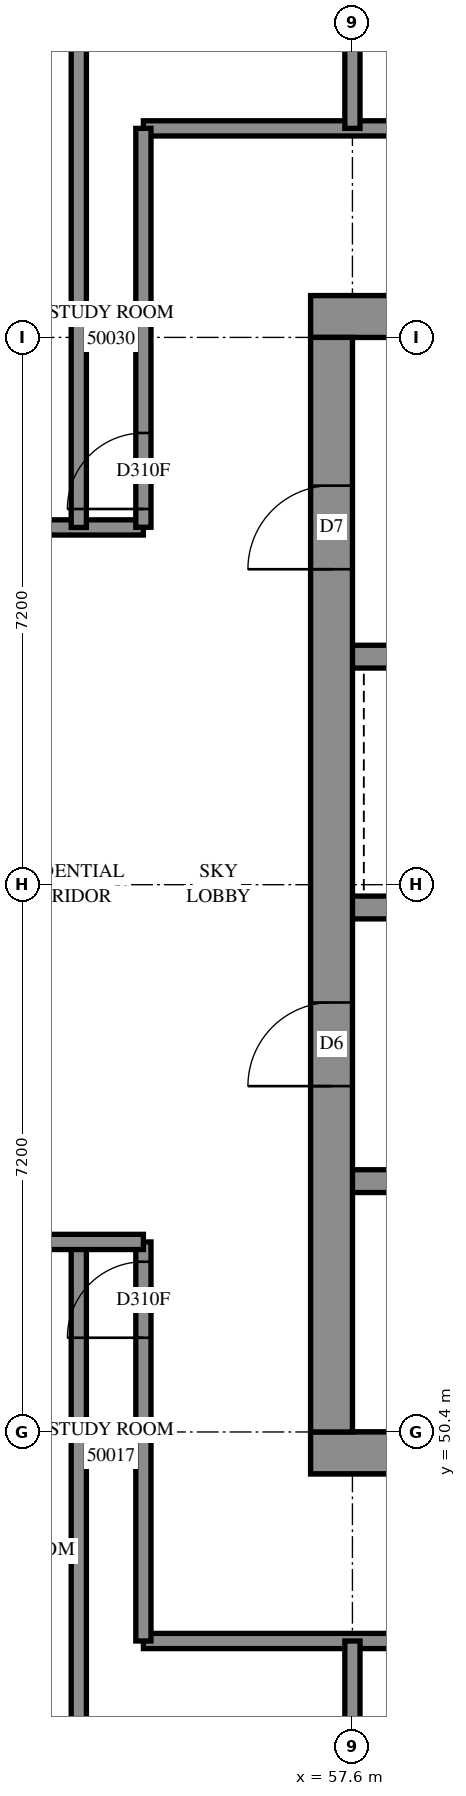
"""IFC4 building model, lengths in metres.
Left out: names, types, materials, properties, quantities, classifications, styles, units other than length and angle.
Written with IfcOpenShell. Run it as: python <this file> out.ifc"""

import sys

from ifc_helpers import new_model, si_unit, direction, frame, frame_2d, origin, place, context, subcontext, project, spatial, rectangle, extrude, element, fill, save


model = new_model("IFC4")
c1 = context("Model", 3, precision=1e-05, world=origin(), true_north=direction((0.0, 1.0)))
c2 = subcontext(c1, "Body", "Model", "MODEL_VIEW")
j1 = project(units=[si_unit("LENGTHUNIT", "METRE"), si_unit("PLANEANGLEUNIT", "RADIAN")], contexts=[c1])
p1 = place(None, origin())
s1 = spatial("IfcSite", under=j1, at=p1, CompositionType="ELEMENT")
p2 = place(p1, origin())
s2 = spatial("IfcBuilding", under=s1, at=p2, CompositionType="ELEMENT")
p3 = place(p2, frame((0.0, 0.0, 185.4)))
s3 = spatial("IfcBuildingStorey", under=s2, at=p3, CompositionType="ELEMENT", Elevation=185.4)
p4 = place(p3, frame((57.05, 50.125, -0.3), z_axis=(0.0, 0.0, 1.0), x_axis=(1.0, 0.0, 0.0)))
e1 = element("IfcWall", 1, at=p4, inside=s3, PredefinedType="SHEAR", context=c2, shape_type="SweptSolid", body=[
    extrude(rectangle(XDim=15.5, YDim=0.55, at=frame_2d((7.75, 0.0))), origin(), (0.0, 0.0, 1.0), 3.5),
])
p5 = place(p3, frame((57.05, 65.075, -0.3), z_axis=(0.0, 0.0, 1.0), x_axis=(1.0, 0.0, 0.0)))
e2 = element("IfcWall", 2, at=p5, inside=s3, PredefinedType="SHEAR", context=c2, shape_type="SweptSolid", body=[
    extrude(rectangle(XDim=15.5, YDim=0.55, at=frame_2d((7.75, 0.0))), origin(), (0.0, 0.0, 1.0), 3.5),
])
p6 = place(p5, frame((10.55, 0.0, 0.3)))
e3 = element("IfcOpeningElement", 3, at=p6, cuts=e2, PredefinedType="OPENING", context=c2, shape_type="SweptSolid", body=[
    extrude(rectangle(XDim=0.8, YDim=2.1, at=frame_2d((0.4, 1.05))), frame((0.0, 0.285, 0.0), z_axis=(0.0, -1.0, 0.0), x_axis=(1.0, 0.0, 0.0)), (0.0, 0.0, 1.0), 0.57),
])
p7 = place(p3, frame((57.325, 50.4, -0.3), z_axis=(0.0, 0.0, 1.0), x_axis=(0.0, 1.0, 0.0)))
e4 = element("IfcWall", 4, at=p7, inside=s3, PredefinedType="SHEAR", context=c2, shape_type="SweptSolid", body=[
    extrude(rectangle(XDim=14.4, YDim=0.55, at=frame_2d((7.2, 0.0))), origin(), (0.0, 0.0, 1.0), 3.5),
])
p8 = place(p7, frame((4.55, 0.0, 0.3)))
e5 = element("IfcOpeningElement", 5, at=p8, cuts=e4, PredefinedType="OPENING", context=c2, shape_type="SweptSolid", body=[
    extrude(rectangle(XDim=1.1, YDim=2.1, at=frame_2d((0.55, 1.05))), frame((0.0, 0.285, 0.0), z_axis=(0.0, -1.0, 0.0), x_axis=(1.0, 0.0, 0.0)), (0.0, 0.0, 1.0), 0.57),
])
p9 = place(p7, frame((11.35, 0.0, 0.3)))
e6 = element("IfcOpeningElement", 6, at=p9, cuts=e4, PredefinedType="OPENING", context=c2, shape_type="SweptSolid", body=[
    extrude(rectangle(XDim=1.1, YDim=2.1, at=frame_2d((0.55, 1.05))), frame((0.0, 0.285, 0.0), z_axis=(0.0, -1.0, 0.0), x_axis=(1.0, 0.0, 0.0)), (0.0, 0.0, 1.0), 0.57),
])
p10 = place(p3, frame((57.6, 53.7, 0.0), z_axis=(0.0, 0.0, 1.0), x_axis=(1.0, 0.0, 0.0)))
e7 = element("IfcWall", 7, at=p10, inside=s3, PredefinedType="SOLIDWALL", context=c2, shape_type="SweptSolid", body=[
    extrude(rectangle(XDim=14.4, YDim=0.3, at=frame_2d((7.2, 0.0))), origin(), (0.0, 0.0, 1.0), 3.9),
])
p11 = place(p10, frame((1.35, 0.0, 0.0)))
e8 = element("IfcOpeningElement", 8, at=p11, cuts=e7, PredefinedType="OPENING", context=c2, shape_type="SweptSolid", body=[
    extrude(rectangle(XDim=0.9, YDim=2.1, at=frame_2d((0.45, 1.05))), frame((0.0, 0.16, 0.0), z_axis=(0.0, -1.0, 0.0), x_axis=(1.0, 0.0, 0.0)), (0.0, 0.0, 1.0), 0.32),
])
p12 = place(p10, frame((4.95, 0.0, 0.0)))
e9 = element("IfcOpeningElement", 9, at=p12, cuts=e7, PredefinedType="OPENING", context=c2, shape_type="SweptSolid", body=[
    extrude(rectangle(XDim=0.9, YDim=2.1, at=frame_2d((0.45, 1.05))), frame((0.0, 0.16, 0.0), z_axis=(0.0, -1.0, 0.0), x_axis=(1.0, 0.0, 0.0)), (0.0, 0.0, 1.0), 0.32),
])
p13 = place(p10, frame((8.55, 0.0, 0.0)))
e10 = element("IfcOpeningElement", 10, at=p13, cuts=e7, PredefinedType="OPENING", context=c2, shape_type="SweptSolid", body=[
    extrude(rectangle(XDim=0.9, YDim=2.1, at=frame_2d((0.45, 1.05))), frame((0.0, 0.16, 0.0), z_axis=(0.0, -1.0, 0.0), x_axis=(1.0, 0.0, 0.0)), (0.0, 0.0, 1.0), 0.32),
])
p14 = place(p10, frame((12.05, 0.0, 0.0)))
e11 = element("IfcOpeningElement", 11, at=p14, cuts=e7, PredefinedType="OPENING", context=c2, shape_type="SweptSolid", body=[
    extrude(rectangle(XDim=1.1, YDim=2.1, at=frame_2d((0.55, 1.05))), frame((0.0, 0.16, 0.0), z_axis=(0.0, -1.0, 0.0), x_axis=(1.0, 0.0, 0.0)), (0.0, 0.0, 1.0), 0.32),
])
p15 = place(p3, frame((57.6, 57.3, 0.0), z_axis=(0.0, 0.0, 1.0), x_axis=(1.0, 0.0, 0.0)))
e12 = element("IfcWall", 12, at=p15, inside=s3, PredefinedType="SOLIDWALL", context=c2, shape_type="SweptSolid", body=[
    extrude(rectangle(XDim=14.4, YDim=0.3, at=frame_2d((7.2, 0.0))), origin(), (0.0, 0.0, 1.0), 3.9),
])
p16 = place(p15, frame((1.25, 0.0, 0.0)))
e13 = element("IfcOpeningElement", 13, at=p16, cuts=e12, PredefinedType="OPENING", context=c2, shape_type="SweptSolid", body=[
    extrude(rectangle(XDim=1.1, YDim=2.1, at=frame_2d((0.55, 1.05))), frame((0.0, 0.16, 0.0), z_axis=(0.0, -1.0, 0.0), x_axis=(1.0, 0.0, 0.0)), (0.0, 0.0, 1.0), 0.32),
])
p17 = place(p15, frame((4.85, 0.0, 0.0)))
e14 = element("IfcOpeningElement", 14, at=p17, cuts=e12, PredefinedType="OPENING", context=c2, shape_type="SweptSolid", body=[
    extrude(rectangle(XDim=1.1, YDim=2.1, at=frame_2d((0.55, 1.05))), frame((0.0, 0.16, 0.0), z_axis=(0.0, -1.0, 0.0), x_axis=(1.0, 0.0, 0.0)), (0.0, 0.0, 1.0), 0.32),
])
p18 = place(p15, frame((8.45, 0.0, 0.0)))
e15 = element("IfcOpeningElement", 15, at=p18, cuts=e12, PredefinedType="OPENING", context=c2, shape_type="SweptSolid", body=[
    extrude(rectangle(XDim=1.1, YDim=2.1, at=frame_2d((0.55, 1.05))), frame((0.0, 0.16, 0.0), z_axis=(0.0, -1.0, 0.0), x_axis=(1.0, 0.0, 0.0)), (0.0, 0.0, 1.0), 0.32),
])
p19 = place(p15, frame((12.05, 0.0, 0.0)))
e16 = element("IfcOpeningElement", 16, at=p19, cuts=e12, PredefinedType="OPENING", context=c2, shape_type="SweptSolid", body=[
    extrude(rectangle(XDim=1.1, YDim=2.1, at=frame_2d((0.55, 1.05))), frame((0.0, 0.16, 0.0), z_axis=(0.0, -1.0, 0.0), x_axis=(1.0, 0.0, 0.0)), (0.0, 0.0, 1.0), 0.32),
])
p20 = place(p3, frame((57.6, 60.6, 0.0), z_axis=(0.0, 0.0, 1.0), x_axis=(1.0, 0.0, 0.0)))
e17 = element("IfcWall", 17, at=p20, inside=s3, PredefinedType="SOLIDWALL", context=c2, shape_type="SweptSolid", body=[
    extrude(rectangle(XDim=7.2, YDim=0.3, at=frame_2d((3.6, 0.0))), origin(), (0.0, 0.0, 1.0), 3.9),
])
p21 = place(p3, frame((54.85, 67.55, 0.0), z_axis=(0.0, 0.0, 1.0), x_axis=(1.0, 0.0, 0.0)))
e18 = element("IfcWall", 18, at=p21, inside=s3, PredefinedType="PARTITIONING", context=c2, shape_type="SweptSolid", body=[
    extrude(rectangle(XDim=19.9, YDim=0.2, at=frame_2d((9.95, 0.0))), origin(), (0.0, 0.0, 1.0), 3.9),
])
p22 = place(p21, frame((4.843, 0.0, 0.0)))
e19 = element("IfcOpeningElement", 19, at=p22, cuts=e18, PredefinedType="OPENING", context=c2, shape_type="SweptSolid", body=[
    extrude(rectangle(XDim=1.0, YDim=2.1, at=frame_2d((0.5, 1.05))), frame((0.0, 0.11, 0.0), z_axis=(0.0, -1.0, 0.0), x_axis=(1.0, 0.0, 0.0)), (0.0, 0.0, 1.0), 0.22),
])
p23 = place(p21, frame((6.918, 0.0, 0.0)))
e20 = element("IfcOpeningElement", 20, at=p23, cuts=e18, PredefinedType="OPENING", context=c2, shape_type="SweptSolid", body=[
    extrude(rectangle(XDim=1.0, YDim=2.1, at=frame_2d((0.5, 1.05))), frame((0.0, 0.11, 0.0), z_axis=(0.0, -1.0, 0.0), x_axis=(1.0, 0.0, 0.0)), (0.0, 0.0, 1.0), 0.22),
])
p24 = place(p21, frame((12.043, 0.0, 0.0)))
e21 = element("IfcOpeningElement", 21, at=p24, cuts=e18, PredefinedType="OPENING", context=c2, shape_type="SweptSolid", body=[
    extrude(rectangle(XDim=1.0, YDim=2.1, at=frame_2d((0.5, 1.05))), frame((0.0, 0.11, 0.0), z_axis=(0.0, -1.0, 0.0), x_axis=(1.0, 0.0, 0.0)), (0.0, 0.0, 1.0), 0.22),
])
p25 = place(p21, frame((14.117, 0.0, 0.0)))
e22 = element("IfcOpeningElement", 22, at=p25, cuts=e18, PredefinedType="OPENING", context=c2, shape_type="SweptSolid", body=[
    extrude(rectangle(XDim=1.0, YDim=2.1, at=frame_2d((0.5, 1.05))), frame((0.0, 0.11, 0.0), z_axis=(0.0, -1.0, 0.0), x_axis=(1.0, 0.0, 0.0)), (0.0, 0.0, 1.0), 0.22),
])
p26 = place(p3, frame((54.85, 47.65, 0.0), z_axis=(0.0, 0.0, 1.0), x_axis=(1.0, 0.0, 0.0)))
e23 = element("IfcWall", 23, at=p26, inside=s3, PredefinedType="PARTITIONING", context=c2, shape_type="SweptSolid", body=[
    extrude(rectangle(XDim=19.354, YDim=0.2, at=frame_2d((9.677, 0.0))), origin(), (0.0, 0.0, 1.0), 3.9),
])
p27 = place(p26, frame((4.782, 0.0, 0.0)))
e24 = element("IfcOpeningElement", 24, at=p27, cuts=e23, PredefinedType="OPENING", context=c2, shape_type="SweptSolid", body=[
    extrude(rectangle(XDim=1.0, YDim=2.1, at=frame_2d((0.5, 1.05))), frame((0.0, 0.11, 0.0), z_axis=(0.0, -1.0, 0.0), x_axis=(1.0, 0.0, 0.0)), (0.0, 0.0, 1.0), 0.22),
])
p28 = place(p26, frame((6.857, 0.0, 0.0)))
e25 = element("IfcOpeningElement", 25, at=p28, cuts=e23, PredefinedType="OPENING", context=c2, shape_type="SweptSolid", body=[
    extrude(rectangle(XDim=1.0, YDim=2.1, at=frame_2d((0.5, 1.05))), frame((0.0, 0.11, 0.0), z_axis=(0.0, -1.0, 0.0), x_axis=(1.0, 0.0, 0.0)), (0.0, 0.0, 1.0), 0.22),
])
p29 = place(p26, frame((11.982, 0.0, 0.0)))
e26 = element("IfcOpeningElement", 26, at=p29, cuts=e23, PredefinedType="OPENING", context=c2, shape_type="SweptSolid", body=[
    extrude(rectangle(XDim=1.0, YDim=2.1, at=frame_2d((0.5, 1.05))), frame((0.0, 0.11, 0.0), z_axis=(0.0, -1.0, 0.0), x_axis=(1.0, 0.0, 0.0)), (0.0, 0.0, 1.0), 0.22),
])
p30 = place(p26, frame((14.057, 0.0, 0.0)))
e27 = element("IfcOpeningElement", 27, at=p30, cuts=e23, PredefinedType="OPENING", context=c2, shape_type="SweptSolid", body=[
    extrude(rectangle(XDim=1.0, YDim=2.1, at=frame_2d((0.5, 1.05))), frame((0.0, 0.11, 0.0), z_axis=(0.0, -1.0, 0.0), x_axis=(1.0, 0.0, 0.0)), (0.0, 0.0, 1.0), 0.22),
])
p31 = place(p3, frame((40.702, 62.3, 0.0), z_axis=(0.0, 0.0, 1.0), x_axis=(1.0, 0.0, 0.0)))
e28 = element("IfcWall", 28, at=p31, inside=s3, PredefinedType="PARTITIONING", context=c2, shape_type="SweptSolid", body=[
    extrude(rectangle(XDim=14.148, YDim=0.2, at=frame_2d((7.074, 0.0))), origin(), (0.0, 0.0, 1.0), 3.9),
])
p32 = place(p31, frame((6.361, 0.0, 0.0)))
e29 = element("IfcOpeningElement", 29, at=p32, cuts=e28, PredefinedType="OPENING", context=c2, shape_type="SweptSolid", body=[
    extrude(rectangle(XDim=1.0, YDim=2.1, at=frame_2d((0.5, 1.05))), frame((0.0, 0.11, 0.0), z_axis=(0.0, -1.0, 0.0), x_axis=(1.0, 0.0, 0.0)), (0.0, 0.0, 1.0), 0.22),
])
p33 = place(p31, frame((11.79, 0.0, 0.0)))
e30 = element("IfcOpeningElement", 30, at=p33, cuts=e28, PredefinedType="OPENING", context=c2, shape_type="SweptSolid", body=[
    extrude(rectangle(XDim=1.0, YDim=2.1, at=frame_2d((0.5, 1.05))), frame((0.0, 0.11, 0.0), z_axis=(0.0, -1.0, 0.0), x_axis=(1.0, 0.0, 0.0)), (0.0, 0.0, 1.0), 0.22),
])
for number, where, z_axis, x_axis in (
    (31, (54.0, 45.13, 0.0), (0.0, 0.0, 1.0), (0.0, 1.0, 0.0)),
    (32, (54.0, 62.3, 0.0), (0.0, 0.0, 1.0), (0.0, 1.0, 0.0)),
):
    element("IfcWall", number, at=place(p3, frame(where, z_axis=z_axis, x_axis=x_axis)), inside=s3, PredefinedType="PARTITIONING", context=c2, shape_type="SweptSolid", body=[
        extrude(rectangle(XDim=7.77, YDim=0.2, at=frame_2d((3.885, 0.0))), origin(), (0.0, 0.0, 1.0), 3.9),
    ])
p34 = place(p3, frame((54.85, 47.65, 0.0), z_axis=(0.0, 0.0, 1.0), x_axis=(0.0, 1.0, 0.0)))
e33 = element("IfcWall", 33, at=p34, inside=s3, PredefinedType="PARTITIONING", context=c2, shape_type="SweptSolid", body=[
    extrude(rectangle(XDim=5.25, YDim=0.2, at=frame_2d((2.625, 0.0))), origin(), (0.0, 0.0, 1.0), 3.9),
])
p35 = place(p34, frame((3.99, 0.0, 0.0)))
e34 = element("IfcOpeningElement", 34, at=p35, cuts=e33, PredefinedType="OPENING", context=c2, shape_type="SweptSolid", body=[
    extrude(rectangle(XDim=1.0, YDim=2.1, at=frame_2d((0.5, 1.05))), frame((0.0, 0.11, 0.0), z_axis=(0.0, -1.0, 0.0), x_axis=(1.0, 0.0, 0.0)), (0.0, 0.0, 1.0), 0.22),
])
p36 = place(p3, frame((54.85, 62.302, 0.0), z_axis=(0.0, 0.0, 1.0), x_axis=(0.0, 1.0, 0.0)))
e35 = element("IfcWall", 35, at=p36, inside=s3, PredefinedType="PARTITIONING", context=c2, shape_type="SweptSolid", body=[
    extrude(rectangle(XDim=5.248, YDim=0.2, at=frame_2d((2.624, 0.0))), origin(), (0.0, 0.0, 1.0), 3.9),
])
p37 = place(p36, frame((0.241, 0.0, 0.0)))
e36 = element("IfcOpeningElement", 36, at=p37, cuts=e35, PredefinedType="OPENING", context=c2, shape_type="SweptSolid", body=[
    extrude(rectangle(XDim=1.0, YDim=2.1, at=frame_2d((0.5, 1.05))), frame((0.0, 0.11, 0.0), z_axis=(0.0, -1.0, 0.0), x_axis=(1.0, 0.0, 0.0)), (0.0, 0.0, 1.0), 0.22),
])
p38 = place(p3, frame((50.4, 52.9, 0.0), z_axis=(0.0, 0.0, 1.0), x_axis=(1.0, 0.0, 0.0)))
e37 = element("IfcWall", 37, at=p38, inside=s3, PredefinedType="PARTITIONING", context=c2, shape_type="SweptSolid", body=[
    extrude(rectangle(XDim=4.45, YDim=0.2, at=frame_2d((2.225, 0.0))), origin(), (0.0, 0.0, 1.0), 3.9),
])
p39 = place(p38, frame((2.033, 0.0, 0.0)))
e38 = element("IfcOpeningElement", 38, at=p39, cuts=e37, PredefinedType="OPENING", context=c2, shape_type="SweptSolid", body=[
    extrude(rectangle(XDim=1.0, YDim=2.1, at=frame_2d((0.5, 1.05))), frame((0.0, 0.11, 0.0), z_axis=(0.0, -1.0, 0.0), x_axis=(1.0, 0.0, 0.0)), (0.0, 0.0, 1.0), 0.22),
])
for number, where, z_axis, x_axis in (
    (39, (57.6, 45.13, 0.0), (0.0, 0.0, 1.0), (0.0, 1.0, 0.0)),
    (40, (57.6, 67.55, 0.0), (0.0, 0.0, 1.0), (0.0, 1.0, 0.0)),
):
    element("IfcWall", number, at=place(p3, frame(where, z_axis=z_axis, x_axis=x_axis)), inside=s3, PredefinedType="PARTITIONING", context=c2, shape_type="SweptSolid", body=[
        extrude(rectangle(XDim=2.52, YDim=0.2, at=frame_2d((1.26, 0.0))), origin(), (0.0, 0.0, 1.0), 3.9),
    ])
p40 = place(p8, origin())
e41 = element("IfcDoor", 41, at=p40, inside=s3, OperationType="DOUBLE_DOOR_SINGLE_SWING", PredefinedType="DOOR", context=c2, shape_type="SweptSolid", body=[
    extrude(rectangle(XDim=1.1, YDim=2.1, at=frame_2d((0.55, 1.05))), frame((0.0, 0.025, 0.0), z_axis=(0.0, -1.0, 0.0), x_axis=(1.0, 0.0, 0.0)), (0.0, 0.0, 1.0), 0.05),
])
fill(e5, e41)
p41 = place(p9, origin())
e42 = element("IfcDoor", 42, at=p41, inside=s3, OperationType="SINGLE_SWING_LEFT", PredefinedType="DOOR", context=c2, shape_type="SweptSolid", body=[
    extrude(rectangle(XDim=1.1, YDim=2.1, at=frame_2d((0.55, 1.05))), frame((0.0, 0.025, 0.0), z_axis=(0.0, -1.0, 0.0), x_axis=(1.0, 0.0, 0.0)), (0.0, 0.0, 1.0), 0.05),
])
fill(e6, e42)
p42 = place(p35, origin())
e43 = element("IfcDoor", 43, at=p42, inside=s3, OperationType="SINGLE_SWING_RIGHT", PredefinedType="DOOR", context=c2, shape_type="SweptSolid", body=[
    extrude(rectangle(XDim=1.0, YDim=2.1, at=frame_2d((0.5, 1.05))), frame((0.0, 0.025, 0.0), z_axis=(0.0, -1.0, 0.0), x_axis=(1.0, 0.0, 0.0)), (0.0, 0.0, 1.0), 0.05),
])
fill(e34, e43)
p43 = place(p37, origin())
e44 = element("IfcDoor", 44, at=p43, inside=s3, OperationType="SINGLE_SWING_LEFT", PredefinedType="DOOR", context=c2, shape_type="SweptSolid", body=[
    extrude(rectangle(XDim=1.0, YDim=2.1, at=frame_2d((0.5, 1.05))), frame((0.0, 0.025, 0.0), z_axis=(0.0, -1.0, 0.0), x_axis=(1.0, 0.0, 0.0)), (0.0, 0.0, 1.0), 0.05),
])
fill(e36, e44)
save(model, sys.argv[1])
